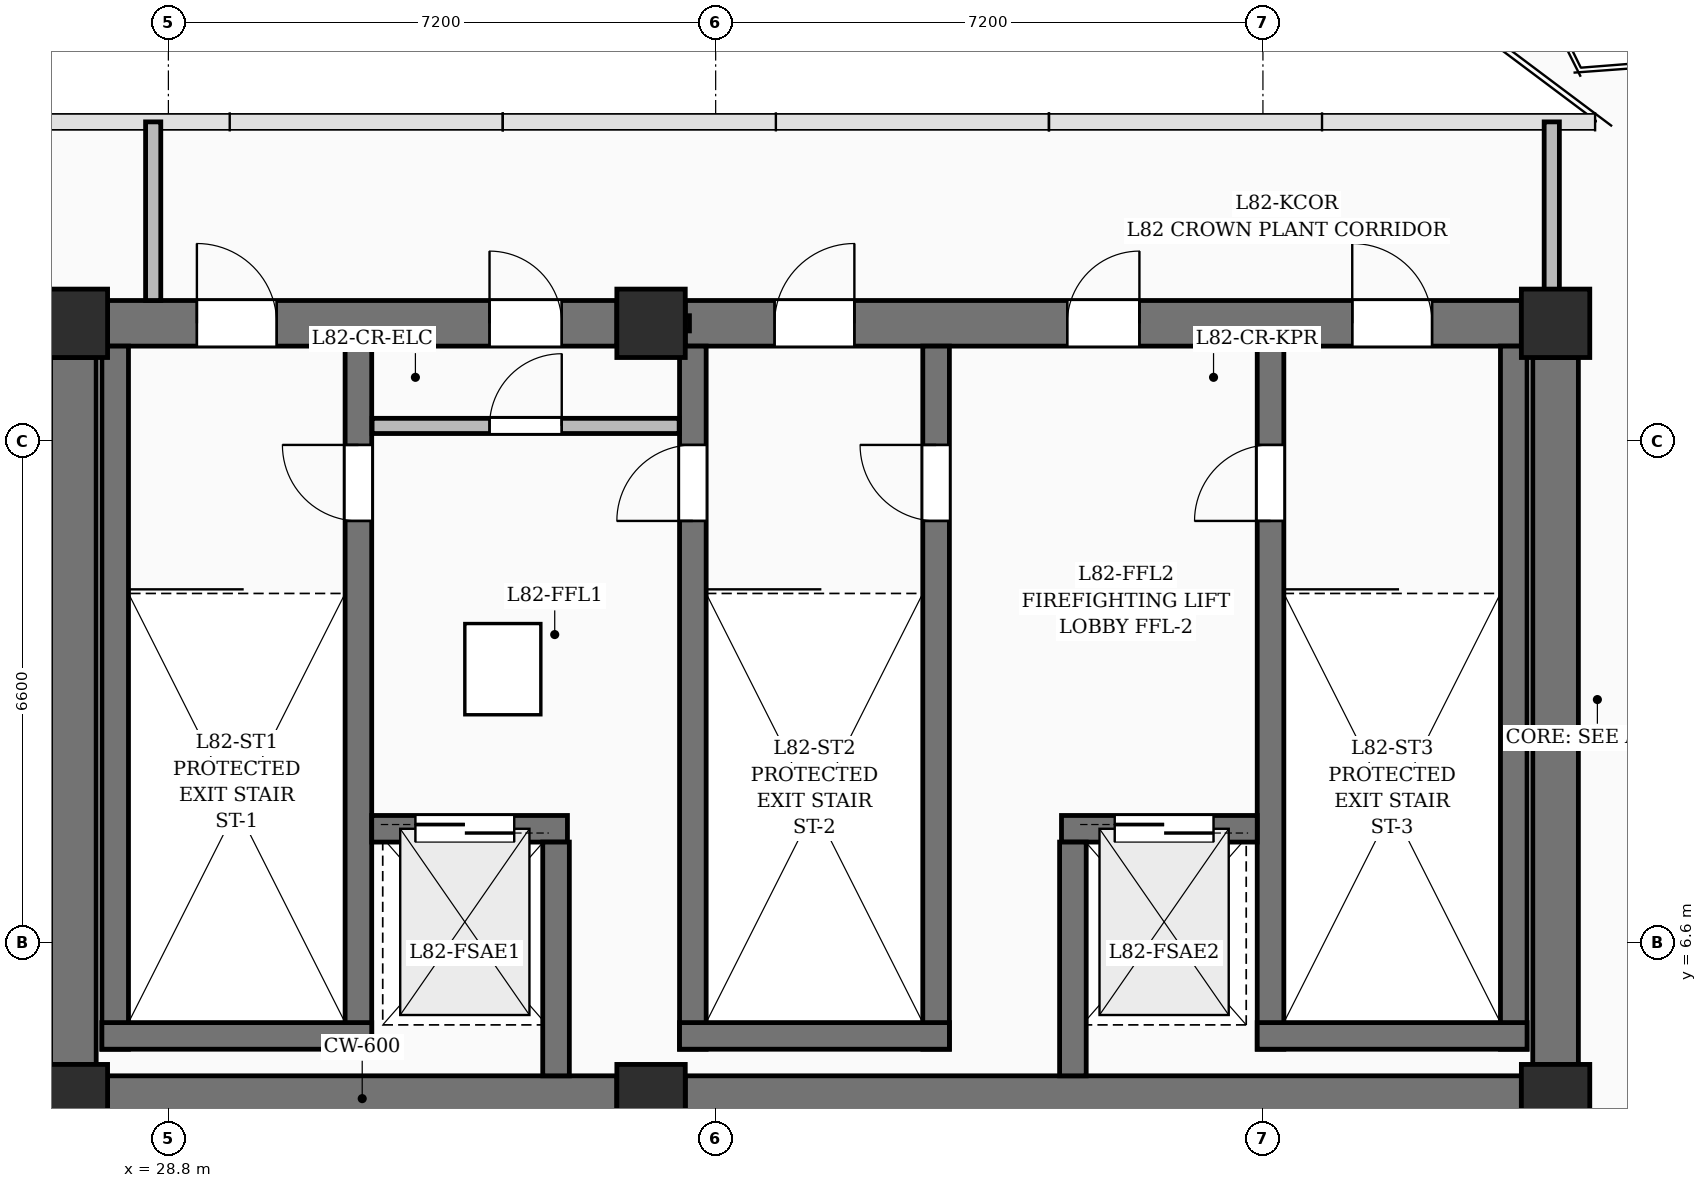
"""IFC4 building model, lengths in metres.
Left out: names, types, materials, properties, quantities, classifications, styles, units other than length and angle.
Written with IfcOpenShell. Run it as: python <this file> out.ifc"""

import sys

from ifc_helpers import new_model, si_unit, direction, frame, frame_2d, origin, origin_2d, place, context, subcontext, project, spatial, rectangle, extrude, element, fill, save


model = new_model("IFC4")
c1 = context("Model", 3, precision=1e-05, world=origin(), true_north=direction((0.0, 1.0)))
c2 = subcontext(c1, "Body", "Model", "MODEL_VIEW")
j1 = project(units=[si_unit("LENGTHUNIT", "METRE"), si_unit("PLANEANGLEUNIT", "RADIAN")], contexts=[c1])
p1 = place(None, origin())
s1 = spatial("IfcSite", under=j1, at=p1, CompositionType="ELEMENT")
p2 = place(p1, origin())
s2 = spatial("IfcBuilding", under=s1, at=p2, CompositionType="ELEMENT")
p3 = place(p2, frame((0.0, 0.0, 318.5)))
s3 = spatial("IfcBuildingStorey", under=s2, at=p3, CompositionType="ELEMENT", Elevation=318.5)
for number, where, z_axis, x_axis in (
    (1, (27.55, 4.55, 0.0), (0.0, 0.0, 1.0), (1.0, 0.0, 0.0)),
    (2, (35.15, 4.55, 0.0), (0.0, 0.0, 1.0), (1.0, 0.0, 0.0)),
    (3, (47.05, 4.55, 0.0), (0.0, 0.0, 1.0), (1.0, 0.0, 0.0)),
    (4, (27.55, 14.75, 0.0), (0.0, 0.0, 1.0), (1.0, 0.0, 0.0)),
    (5, (35.15, 14.75, 0.0), (0.0, 0.0, 1.0), (1.0, 0.0, 0.0)),
    (6, (47.05, 14.75, 0.0), (0.0, 0.0, 1.0), (1.0, 0.0, 0.0)),
):
    element("IfcColumn", number, at=place(p3, frame(where, z_axis=z_axis, x_axis=x_axis)), inside=s3, PredefinedType="COLUMN", context=c2, shape_type="SweptSolid", body=[
        extrude(rectangle(XDim=0.9, YDim=0.9, at=origin_2d()), origin(), (0.0, 0.0, 1.0), 3.4),
    ])
p4 = place(p3, frame((28.0, 4.55, 0.0), z_axis=(0.0, 0.0, 1.0), x_axis=(1.0, 0.0, 0.0)))
e7 = element("IfcWall", 7, at=p4, inside=s3, PredefinedType="SHEAR", context=c2, shape_type="SweptSolid", body=[
    extrude(rectangle(XDim=6.7, YDim=0.6, at=frame_2d((3.35, 0.0))), origin(), (0.0, 0.0, 1.0), 3.4),
])
p5 = place(p3, frame((35.6, 4.55, 0.0), z_axis=(0.0, 0.0, 1.0), x_axis=(1.0, 0.0, 0.0)))
e8 = element("IfcWall", 8, at=p5, inside=s3, PredefinedType="SHEAR", context=c2, shape_type="SweptSolid", body=[
    extrude(rectangle(XDim=11.0, YDim=0.6, at=frame_2d((5.5, 0.0))), origin(), (0.0, 0.0, 1.0), 3.4),
])
p6 = place(p3, frame((28.0, 14.75, 0.0), z_axis=(0.0, 0.0, 1.0), x_axis=(1.0, 0.0, 0.0)))
e9 = element("IfcWall", 9, at=p6, inside=s3, PredefinedType="SHEAR", context=c2, shape_type="SweptSolid", body=[
    extrude(rectangle(XDim=6.7, YDim=0.6, at=frame_2d((3.35, 0.0))), origin(), (0.0, 0.0, 1.0), 3.4),
])
p7 = place(p6, frame((1.175, 0.0, 0.0)))
e10 = element("IfcOpeningElement", 10, at=p7, cuts=e9, PredefinedType="OPENING", context=c2, shape_type="SweptSolid", body=[
    extrude(rectangle(XDim=1.05, YDim=2.15, at=frame_2d((0.525, 1.075))), frame((0.0, 0.31, 0.0), z_axis=(0.0, -1.0, 0.0), x_axis=(1.0, 0.0, 0.0)), (0.0, 0.0, 1.0), 0.62),
])
p8 = place(p6, frame((5.025, 0.0, 0.0)))
e11 = element("IfcOpeningElement", 11, at=p8, cuts=e9, PredefinedType="OPENING", context=c2, shape_type="SweptSolid", body=[
    extrude(rectangle(XDim=0.95, YDim=2.15, at=frame_2d((0.475, 1.075))), frame((0.0, 0.31, 0.0), z_axis=(0.0, -1.0, 0.0), x_axis=(1.0, 0.0, 0.0)), (0.0, 0.0, 1.0), 0.62),
])
p9 = place(p3, frame((35.6, 14.75, 0.0), z_axis=(0.0, 0.0, 1.0), x_axis=(1.0, 0.0, 0.0)))
e12 = element("IfcWall", 12, at=p9, inside=s3, PredefinedType="SHEAR", context=c2, shape_type="SweptSolid", body=[
    extrude(rectangle(XDim=11.0, YDim=0.6, at=frame_2d((5.5, 0.0))), origin(), (0.0, 0.0, 1.0), 3.4),
])
p10 = place(p9, frame((1.175, 0.0, 0.0)))
e13 = element("IfcOpeningElement", 13, at=p10, cuts=e12, PredefinedType="OPENING", context=c2, shape_type="SweptSolid", body=[
    extrude(rectangle(XDim=1.05, YDim=2.15, at=frame_2d((0.525, 1.075))), frame((0.0, 0.31, 0.0), z_axis=(0.0, -1.0, 0.0), x_axis=(1.0, 0.0, 0.0)), (0.0, 0.0, 1.0), 0.62),
])
p11 = place(p9, frame((8.775, 0.0, 0.0)))
e14 = element("IfcOpeningElement", 14, at=p11, cuts=e12, PredefinedType="OPENING", context=c2, shape_type="SweptSolid", body=[
    extrude(rectangle(XDim=1.05, YDim=2.15, at=frame_2d((0.525, 1.075))), frame((0.0, 0.31, 0.0), z_axis=(0.0, -1.0, 0.0), x_axis=(1.0, 0.0, 0.0)), (0.0, 0.0, 1.0), 0.62),
])
p12 = place(p9, frame((5.025, 0.0, 0.0)))
e15 = element("IfcOpeningElement", 15, at=p12, cuts=e12, PredefinedType="OPENING", context=c2, shape_type="SweptSolid", body=[
    extrude(rectangle(XDim=0.95, YDim=2.15, at=frame_2d((0.475, 1.075))), frame((0.0, 0.31, 0.0), z_axis=(0.0, -1.0, 0.0), x_axis=(1.0, 0.0, 0.0)), (0.0, 0.0, 1.0), 0.62),
])
for number, where, z_axis, x_axis in (
    (16, (27.55, 5.0, 0.0), (0.0, 0.0, 1.0), (0.0, 1.0, 0.0)),
    (17, (47.05, 5.0, 0.0), (0.0, 0.0, 1.0), (0.0, 1.0, 0.0)),
):
    element("IfcWall", number, at=place(p3, frame(where, z_axis=z_axis, x_axis=x_axis)), inside=s3, PredefinedType="SHEAR", context=c2, shape_type="SweptSolid", body=[
        extrude(rectangle(XDim=9.3, YDim=0.6, at=frame_2d((4.65, 0.0))), origin(), (0.0, 0.0, 1.0), 3.4),
    ])
p13 = place(p3, frame((28.1, 5.2, 0.0), z_axis=(0.0, 0.0, 1.0), x_axis=(0.0, 1.0, 0.0)))
e18 = element("IfcWall", 18, at=p13, inside=s3, PredefinedType="SOLIDWALL", context=c2, shape_type="SweptSolid", body=[
    extrude(rectangle(XDim=9.25, YDim=0.35, at=frame_2d((4.625, 0.0))), origin(), (0.0, 0.0, 1.0), 3.4),
])
p14 = place(p3, frame((31.3, 5.2, 0.0), z_axis=(0.0, 0.0, 1.0), x_axis=(0.0, 1.0, 0.0)))
e19 = element("IfcWall", 19, at=p14, inside=s3, PredefinedType="SOLIDWALL", context=c2, shape_type="SweptSolid", body=[
    extrude(rectangle(XDim=9.25, YDim=0.35, at=frame_2d((4.625, 0.0))), origin(), (0.0, 0.0, 1.0), 3.4),
])
p15 = place(p14, frame((6.95, 0.0, 0.0)))
e20 = element("IfcOpeningElement", 20, at=p15, cuts=e19, PredefinedType="OPENING", context=c2, shape_type="SweptSolid", body=[
    extrude(rectangle(XDim=1.0, YDim=2.15, at=frame_2d((0.5, 1.075))), frame((0.0, 0.185, 0.0), z_axis=(0.0, -1.0, 0.0), x_axis=(1.0, 0.0, 0.0)), (0.0, 0.0, 1.0), 0.37),
])
p16 = place(p3, frame((27.925, 5.375, 0.0), z_axis=(0.0, 0.0, 1.0), x_axis=(1.0, 0.0, 0.0)))
e21 = element("IfcWall", 21, at=p16, inside=s3, PredefinedType="SOLIDWALL", context=c2, shape_type="SweptSolid", body=[
    extrude(rectangle(XDim=3.55, YDim=0.35, at=frame_2d((1.775, 0.0))), origin(), (0.0, 0.0, 1.0), 3.4),
])
p17 = place(p3, frame((35.7, 5.2, 0.0), z_axis=(0.0, 0.0, 1.0), x_axis=(0.0, 1.0, 0.0)))
e22 = element("IfcWall", 22, at=p17, inside=s3, PredefinedType="SOLIDWALL", context=c2, shape_type="SweptSolid", body=[
    extrude(rectangle(XDim=9.25, YDim=0.35, at=frame_2d((4.625, 0.0))), origin(), (0.0, 0.0, 1.0), 3.4),
])
p18 = place(p17, frame((6.95, 0.0, 0.0)))
e23 = element("IfcOpeningElement", 23, at=p18, cuts=e22, PredefinedType="OPENING", context=c2, shape_type="SweptSolid", body=[
    extrude(rectangle(XDim=1.0, YDim=2.15, at=frame_2d((0.5, 1.075))), frame((0.0, 0.185, 0.0), z_axis=(0.0, -1.0, 0.0), x_axis=(1.0, 0.0, 0.0)), (0.0, 0.0, 1.0), 0.37),
])
p19 = place(p3, frame((38.9, 5.2, 0.0), z_axis=(0.0, 0.0, 1.0), x_axis=(0.0, 1.0, 0.0)))
e24 = element("IfcWall", 24, at=p19, inside=s3, PredefinedType="SOLIDWALL", context=c2, shape_type="SweptSolid", body=[
    extrude(rectangle(XDim=9.25, YDim=0.35, at=frame_2d((4.625, 0.0))), origin(), (0.0, 0.0, 1.0), 3.4),
])
p20 = place(p19, frame((6.95, 0.0, 0.0)))
e25 = element("IfcOpeningElement", 25, at=p20, cuts=e24, PredefinedType="OPENING", context=c2, shape_type="SweptSolid", body=[
    extrude(rectangle(XDim=1.0, YDim=2.15, at=frame_2d((0.5, 1.075))), frame((0.0, 0.185, 0.0), z_axis=(0.0, -1.0, 0.0), x_axis=(1.0, 0.0, 0.0)), (0.0, 0.0, 1.0), 0.37),
])
p21 = place(p3, frame((35.525, 5.375, 0.0), z_axis=(0.0, 0.0, 1.0), x_axis=(1.0, 0.0, 0.0)))
e26 = element("IfcWall", 26, at=p21, inside=s3, PredefinedType="SOLIDWALL", context=c2, shape_type="SweptSolid", body=[
    extrude(rectangle(XDim=3.55, YDim=0.35, at=frame_2d((1.775, 0.0))), origin(), (0.0, 0.0, 1.0), 3.4),
])
p22 = place(p3, frame((43.3, 5.2, 0.0), z_axis=(0.0, 0.0, 1.0), x_axis=(0.0, 1.0, 0.0)))
e27 = element("IfcWall", 27, at=p22, inside=s3, PredefinedType="SOLIDWALL", context=c2, shape_type="SweptSolid", body=[
    extrude(rectangle(XDim=9.25, YDim=0.35, at=frame_2d((4.625, 0.0))), origin(), (0.0, 0.0, 1.0), 3.4),
])
p23 = place(p22, frame((6.95, 0.0, 0.0)))
e28 = element("IfcOpeningElement", 28, at=p23, cuts=e27, PredefinedType="OPENING", context=c2, shape_type="SweptSolid", body=[
    extrude(rectangle(XDim=1.0, YDim=2.15, at=frame_2d((0.5, 1.075))), frame((0.0, 0.185, 0.0), z_axis=(0.0, -1.0, 0.0), x_axis=(1.0, 0.0, 0.0)), (0.0, 0.0, 1.0), 0.37),
])
p24 = place(p3, frame((46.5, 5.2, 0.0), z_axis=(0.0, 0.0, 1.0), x_axis=(0.0, 1.0, 0.0)))
e29 = element("IfcWall", 29, at=p24, inside=s3, PredefinedType="SOLIDWALL", context=c2, shape_type="SweptSolid", body=[
    extrude(rectangle(XDim=9.25, YDim=0.35, at=frame_2d((4.625, 0.0))), origin(), (0.0, 0.0, 1.0), 3.4),
])
p25 = place(p3, frame((43.125, 5.375, 0.0), z_axis=(0.0, 0.0, 1.0), x_axis=(1.0, 0.0, 0.0)))
e30 = element("IfcWall", 30, at=p25, inside=s3, PredefinedType="SOLIDWALL", context=c2, shape_type="SweptSolid", body=[
    extrude(rectangle(XDim=3.55, YDim=0.35, at=frame_2d((1.775, 0.0))), origin(), (0.0, 0.0, 1.0), 3.4),
])
p26 = place(p3, frame((31.475, 8.1, 0.0), z_axis=(0.0, 0.0, 1.0), x_axis=(1.0, 0.0, 0.0)))
e31 = element("IfcWall", 31, at=p26, inside=s3, PredefinedType="SOLIDWALL", context=c2, shape_type="SweptSolid", body=[
    extrude(rectangle(XDim=2.575, YDim=0.35, at=frame_2d((1.288, 0.0))), origin(), (0.0, 0.0, 1.0), 3.4),
])
p27 = place(p26, frame((0.575, 0.0, 0.0)))
e32 = element("IfcOpeningElement", 32, at=p27, cuts=e31, PredefinedType="OPENING", context=c2, shape_type="SweptSolid", body=[
    extrude(rectangle(XDim=1.3, YDim=2.25, at=frame_2d((0.65, 1.125))), frame((0.0, 0.185, 0.0), z_axis=(0.0, -1.0, 0.0), x_axis=(1.0, 0.0, 0.0)), (0.0, 0.0, 1.0), 0.37),
])
p28 = place(p3, frame((40.55, 8.1, 0.0), z_axis=(0.0, 0.0, 1.0), x_axis=(1.0, 0.0, 0.0)))
e33 = element("IfcWall", 33, at=p28, inside=s3, PredefinedType="SOLIDWALL", context=c2, shape_type="SweptSolid", body=[
    extrude(rectangle(XDim=2.575, YDim=0.35, at=frame_2d((1.288, 0.0))), origin(), (0.0, 0.0, 1.0), 3.4),
])
p29 = place(p28, frame((0.7, 0.0, 0.0)))
e34 = element("IfcOpeningElement", 34, at=p29, cuts=e33, PredefinedType="OPENING", context=c2, shape_type="SweptSolid", body=[
    extrude(rectangle(XDim=1.3, YDim=2.25, at=frame_2d((0.65, 1.125))), frame((0.0, 0.185, 0.0), z_axis=(0.0, -1.0, 0.0), x_axis=(1.0, 0.0, 0.0)), (0.0, 0.0, 1.0), 0.37),
])
for number, where, z_axis, x_axis in (
    (35, (33.9, 4.85, 0.0), (0.0, 0.0, 1.0), (0.0, 1.0, 0.0)),
    (36, (40.7, 4.85, 0.0), (0.0, 0.0, 1.0), (0.0, 1.0, 0.0)),
):
    element("IfcWall", number, at=place(p3, frame(where, z_axis=z_axis, x_axis=x_axis)), inside=s3, PredefinedType="SOLIDWALL", context=c2, shape_type="SweptSolid", body=[
        extrude(rectangle(XDim=3.075, YDim=0.35, at=frame_2d((1.538, 0.0))), origin(), (0.0, 0.0, 1.0), 3.4),
    ])
p30 = place(p3, frame((34.72, 14.75, 0.0), z_axis=(0.0, 0.0, 1.0), x_axis=(1.0, 0.0, 0.0)))
e37 = element("IfcWall", 37, at=p30, inside=s3, PredefinedType="PARTITIONING", context=c2, shape_type="SweptSolid", body=[
    extrude(rectangle(XDim=0.935, YDim=0.2, at=frame_2d((0.468, 0.0))), origin(), (0.0, 0.0, 1.0), 2.66),
])
p31 = place(p3, frame((31.48, 13.4, 0.0), z_axis=(0.0, 0.0, 1.0), x_axis=(1.0, 0.0, 0.0)))
e38 = element("IfcWall", 38, at=p31, inside=s3, PredefinedType="PARTITIONING", context=c2, shape_type="SweptSolid", body=[
    extrude(rectangle(XDim=4.04, YDim=0.2, at=frame_2d((2.02, 0.0))), origin(), (0.0, 0.0, 1.0), 3.68),
])
p32 = place(p31, frame((1.545, 0.0, 0.0)))
e39 = element("IfcOpeningElement", 39, at=p32, cuts=e38, PredefinedType="OPENING", context=c2, shape_type="SweptSolid", body=[
    extrude(rectangle(XDim=0.95, YDim=2.15, at=frame_2d((0.475, 1.075))), frame((0.0, 0.11, 0.0), z_axis=(0.0, -1.0, 0.0), x_axis=(1.0, 0.0, 0.0)), (0.0, 0.0, 1.0), 0.22),
])
for number, where, z_axis, x_axis in (
    (40, (28.6, 17.4, 0.0), (0.0, 0.0, 1.0), (0.0, -1.0, 0.0)),
    (41, (47.0, 15.05, 0.0), (0.0, 0.0, 1.0), (0.0, 1.0, 0.0)),
):
    element("IfcWall", number, at=place(p3, frame(where, z_axis=z_axis, x_axis=x_axis)), inside=s3, PredefinedType="PARTITIONING", context=c2, shape_type="SweptSolid", body=[
        extrude(rectangle(XDim=2.35, YDim=0.2, at=frame_2d((1.175, 0.0))), origin(), (0.0, 0.0, 1.0), 3.68),
    ])
p33 = place(p2, frame((0.0, 0.0, 322.5)))
p34 = place(p33, frame((0.0, 0.0, -0.6)))
p35 = place(p34, frame((33.2, 10.2, 0.0)))
p36 = place(p35, frame((0.0, 0.0, 0.27)))
e42 = element("IfcDoor", 42, at=p36, inside=s3, OperationType="SINGLE_SWING_LEFT", PredefinedType="TRAPDOOR", context=c2, shape_type="SweptSolid", body=[
    extrude(rectangle(XDim=1.0, YDim=1.2, at=origin_2d()), origin(), (0.0, 0.0, 1.0), 0.05),
])
p37 = place(p7, origin())
e43 = element("IfcDoor", 43, at=p37, inside=s3, OperationType="SINGLE_SWING_LEFT", PredefinedType="DOOR", context=c2, shape_type="SweptSolid", body=[
    extrude(rectangle(XDim=1.05, YDim=2.15, at=frame_2d((0.525, 1.075))), frame((0.0, 0.025, 0.0), z_axis=(0.0, -1.0, 0.0), x_axis=(1.0, 0.0, 0.0)), (0.0, 0.0, 1.0), 0.05),
])
fill(e10, e43)
p38 = place(p10, origin())
e44 = element("IfcDoor", 44, at=p38, inside=s3, OperationType="SINGLE_SWING_RIGHT", PredefinedType="DOOR", context=c2, shape_type="SweptSolid", body=[
    extrude(rectangle(XDim=1.05, YDim=2.15, at=frame_2d((0.525, 1.075))), frame((0.0, 0.025, 0.0), z_axis=(0.0, -1.0, 0.0), x_axis=(1.0, 0.0, 0.0)), (0.0, 0.0, 1.0), 0.05),
])
fill(e13, e44)
p39 = place(p11, origin())
e45 = element("IfcDoor", 45, at=p39, inside=s3, OperationType="SINGLE_SWING_LEFT", PredefinedType="DOOR", context=c2, shape_type="SweptSolid", body=[
    extrude(rectangle(XDim=1.05, YDim=2.15, at=frame_2d((0.525, 1.075))), frame((0.0, 0.025, 0.0), z_axis=(0.0, -1.0, 0.0), x_axis=(1.0, 0.0, 0.0)), (0.0, 0.0, 1.0), 0.05),
])
fill(e14, e45)
p40 = place(p15, origin())
e46 = element("IfcDoor", 46, at=p40, inside=s3, OperationType="SINGLE_SWING_RIGHT", PredefinedType="DOOR", context=c2, shape_type="SweptSolid", body=[
    extrude(rectangle(XDim=1.0, YDim=2.15, at=frame_2d((0.5, 1.075))), frame((0.0, 0.025, 0.0), z_axis=(0.0, -1.0, 0.0), x_axis=(1.0, 0.0, 0.0)), (0.0, 0.0, 1.0), 0.05),
])
fill(e20, e46)
p41 = place(p18, origin())
e47 = element("IfcDoor", 47, at=p41, inside=s3, OperationType="SINGLE_SWING_LEFT", PredefinedType="DOOR", context=c2, shape_type="SweptSolid", body=[
    extrude(rectangle(XDim=1.0, YDim=2.15, at=frame_2d((0.5, 1.075))), frame((0.0, 0.025, 0.0), z_axis=(0.0, -1.0, 0.0), x_axis=(1.0, 0.0, 0.0)), (0.0, 0.0, 1.0), 0.05),
])
fill(e23, e47)
p42 = place(p20, origin())
e48 = element("IfcDoor", 48, at=p42, inside=s3, OperationType="SINGLE_SWING_RIGHT", PredefinedType="DOOR", context=c2, shape_type="SweptSolid", body=[
    extrude(rectangle(XDim=1.0, YDim=2.15, at=frame_2d((0.5, 1.075))), frame((0.0, 0.025, 0.0), z_axis=(0.0, -1.0, 0.0), x_axis=(1.0, 0.0, 0.0)), (0.0, 0.0, 1.0), 0.05),
])
fill(e25, e48)
p43 = place(p23, origin())
e49 = element("IfcDoor", 49, at=p43, inside=s3, OperationType="SINGLE_SWING_LEFT", PredefinedType="DOOR", context=c2, shape_type="SweptSolid", body=[
    extrude(rectangle(XDim=1.0, YDim=2.15, at=frame_2d((0.5, 1.075))), frame((0.0, 0.025, 0.0), z_axis=(0.0, -1.0, 0.0), x_axis=(1.0, 0.0, 0.0)), (0.0, 0.0, 1.0), 0.05),
])
fill(e28, e49)
p44 = place(p27, origin())
e50 = element("IfcDoor", 50, at=p44, inside=s3, OperationType="DOUBLE_DOOR_SLIDING", PredefinedType="DOOR", context=c2, shape_type="SweptSolid", body=[
    extrude(rectangle(XDim=1.3, YDim=2.25, at=frame_2d((0.65, 1.125))), frame((0.0, 0.025, 0.0), z_axis=(0.0, -1.0, 0.0), x_axis=(1.0, 0.0, 0.0)), (0.0, 0.0, 1.0), 0.05),
])
fill(e32, e50)
p45 = place(p29, origin())
e51 = element("IfcDoor", 51, at=p45, inside=s3, OperationType="DOUBLE_DOOR_SLIDING", PredefinedType="DOOR", context=c2, shape_type="SweptSolid", body=[
    extrude(rectangle(XDim=1.3, YDim=2.25, at=frame_2d((0.65, 1.125))), frame((0.0, 0.025, 0.0), z_axis=(0.0, -1.0, 0.0), x_axis=(1.0, 0.0, 0.0)), (0.0, 0.0, 1.0), 0.05),
])
fill(e34, e51)
p46 = place(p32, origin())
e52 = element("IfcDoor", 52, at=p46, inside=s3, OperationType="SINGLE_SWING_RIGHT", PredefinedType="DOOR", context=c2, shape_type="SweptSolid", body=[
    extrude(rectangle(XDim=0.95, YDim=2.15, at=frame_2d((0.475, 1.075))), frame((0.0, 0.025, 0.0), z_axis=(0.0, -1.0, 0.0), x_axis=(1.0, 0.0, 0.0)), (0.0, 0.0, 1.0), 0.05),
])
fill(e39, e52)
p47 = place(p8, origin())
e53 = element("IfcDoor", 53, at=p47, inside=s3, OperationType="SINGLE_SWING_LEFT", PredefinedType="DOOR", context=c2, shape_type="SweptSolid", body=[
    extrude(rectangle(XDim=0.95, YDim=2.15, at=frame_2d((0.475, 1.075))), frame((0.0, 0.025, 0.0), z_axis=(0.0, -1.0, 0.0), x_axis=(1.0, 0.0, 0.0)), (0.0, 0.0, 1.0), 0.05),
])
fill(e11, e53)
p48 = place(p12, origin())
e54 = element("IfcDoor", 54, at=p48, inside=s3, OperationType="SINGLE_SWING_RIGHT", PredefinedType="DOOR", context=c2, shape_type="SweptSolid", body=[
    extrude(rectangle(XDim=0.95, YDim=2.15, at=frame_2d((0.475, 1.075))), frame((0.0, 0.025, 0.0), z_axis=(0.0, -1.0, 0.0), x_axis=(1.0, 0.0, 0.0)), (0.0, 0.0, 1.0), 0.05),
])
fill(e15, e54)
save(model, sys.argv[1])
